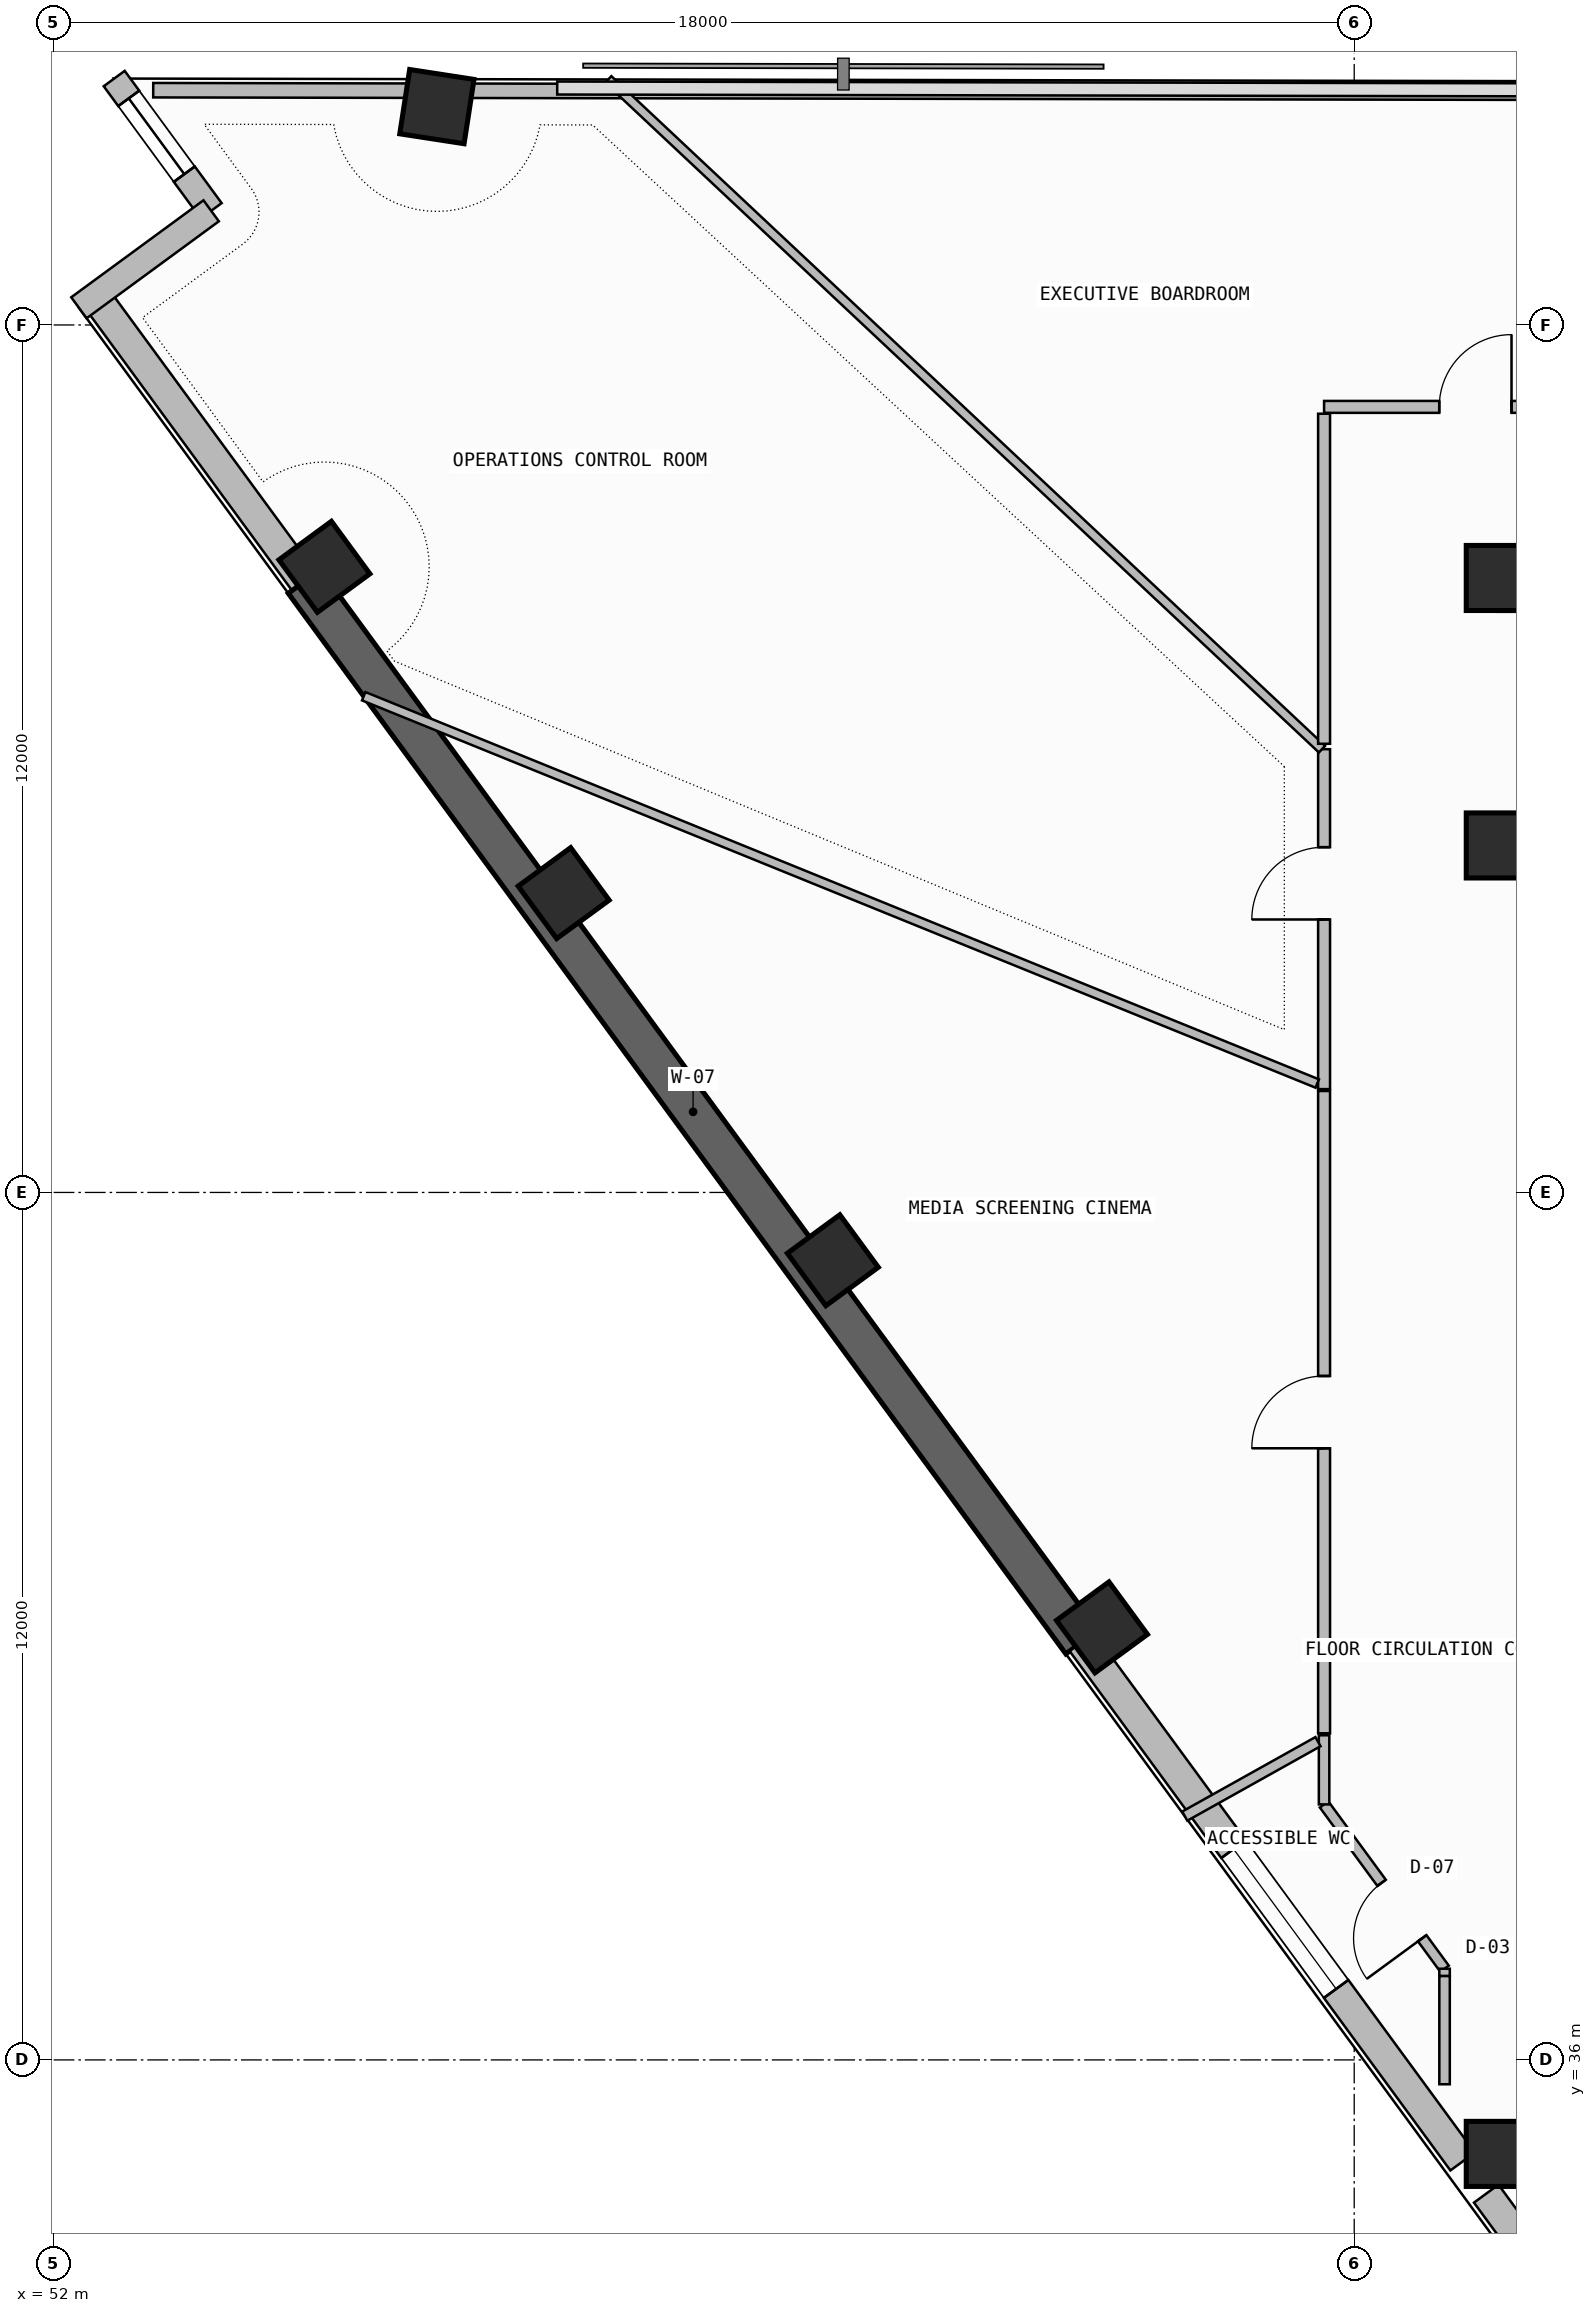
"""IFC4 building model, lengths in metres.
Left out: names, types, materials, properties, quantities, classifications, styles, units other than length and angle.
Written with IfcOpenShell. Run it as: python <this file> out.ifc"""

import sys

from ifc_helpers import new_model, si_unit, direction, frame, frame_2d, origin, origin_2d, place, context, subcontext, project, spatial, rectangle, extrude, element, fill, save


model = new_model("IFC4")
c1 = context("Model", 3, precision=1e-05, world=origin(), true_north=direction((0.0, 1.0)))
c2 = subcontext(c1, "Body", "Model", "MODEL_VIEW")
j1 = project(units=[si_unit("LENGTHUNIT", "METRE"), si_unit("PLANEANGLEUNIT", "RADIAN")], contexts=[c1])
p1 = place(None, origin())
s1 = spatial("IfcSite", under=j1, at=p1, CompositionType="ELEMENT")
p2 = place(p1, origin())
s2 = spatial("IfcBuilding", under=s1, at=p2, CompositionType="ELEMENT")
p3 = place(p2, frame((0.0, 0.0, 246.66)))
s3 = spatial("IfcBuildingStorey", under=s2, at=p3, CompositionType="ELEMENT", Elevation=246.66)
p4 = place(p3, frame((72.0, 56.35, -0.26), z_axis=(0.0, 0.0, 1.0), x_axis=(1.0, 0.0, 0.0)))
e1 = element("IfcWall", 1, at=p4, inside=s3, PredefinedType="SHEAR", context=c2, shape_type="SweptSolid", body=[
    extrude(rectangle(XDim=13.6, YDim=0.6, at=frame_2d((6.8, 0.0))), origin(), (0.0, 0.0, 1.0), 3.52),
])
for number, where, z_axis, x_axis in (
    (2, (72.0, 34.7, 0.0), (0.0, 0.0, 1.0), (1.0, 0.0, 0.0)),
    (3, (72.0, 52.8, 0.0), (0.0, 0.0, 1.0), (1.0, 0.0, 0.0)),
    (4, (72.0, 56.5, 0.0), (0.0, 0.0, 1.0), (1.0, 0.0, 0.0)),
    (5, (57.309, 63.021, 0.0), (0.0, 0.0, 1.0), (0.152, 0.988, 0.0)),
    (6, (55.753, 56.654, 0.0), (0.0, 0.0, 1.0), (-0.591, 0.806, 0.0)),
    (7, (59.063, 52.14, 0.0), (0.0, 0.0, 1.0), (-0.591, 0.806, 0.0)),
    (8, (62.787, 47.062, 0.0), (0.0, 0.0, 1.0), (-0.591, 0.806, 0.0)),
    (9, (66.51, 41.983, 0.0), (0.0, 0.0, 1.0), (-0.591, 0.806, 0.0)),
):
    element("IfcColumn", number, at=place(p3, frame(where, z_axis=z_axis, x_axis=x_axis)), inside=s3, PredefinedType="COLUMN", context=c2, shape_type="SweptSolid", body=[
        extrude(rectangle(XDim=0.9, YDim=0.9, at=origin_2d()), origin(), (0.0, 0.0, 1.0), 3.52),
    ])
p5 = place(p3, frame((52.579, 60.4, 0.0), z_axis=(0.0, 0.0, 1.0), x_axis=(0.591311800505, -0.806443026248, 0.0)))
e10 = element("IfcWall", 10, at=p5, inside=s3, PredefinedType="SOLIDWALL", context=c2, shape_type="SweptSolid", body=[
    extrude(rectangle(XDim=4.898, YDim=0.42, at=frame_2d((2.449, 0.0))), origin(), (0.0, 0.0, 1.0), 2.645),
])
p6 = place(p3, frame((55.475, 56.45, -0.26), z_axis=(0.0, 0.0, 1.0), x_axis=(0.591309555876, -0.806444672082, 0.0)))
e11 = element("IfcWall", 11, at=p6, inside=s3, PredefinedType="SHEAR", context=c2, shape_type="SweptSolid", body=[
    extrude(rectangle(XDim=18.192, YDim=0.55, at=frame_2d((9.096, 0.0))), origin(), (0.0, 0.0, 1.0), 3.52),
])
p7 = place(p3, frame((66.232, 41.779, 0.0), z_axis=(0.0, 0.0, 1.0), x_axis=(0.591309008949, -0.806445073105, 0.0)))
e12 = element("IfcWall", 12, at=p7, inside=s3, PredefinedType="SOLIDWALL", context=c2, shape_type="SweptSolid", body=[
    extrude(rectangle(XDim=8.908, YDim=0.42, at=frame_2d((4.454, 0.0))), origin(), (0.0, 0.0, 1.0), 2.645),
])
p8 = place(p7, frame((3.549, 0.0, 1.1)))
e13 = element("IfcOpeningElement", 13, at=p8, cuts=e12, PredefinedType="OPENING", context=c2, shape_type="SweptSolid", body=[
    extrude(rectangle(XDim=2.4, YDim=1.2, at=frame_2d((1.2, 0.6))), frame((0.0, 0.22, 0.0), z_axis=(0.0, -1.0, 0.0), x_axis=(1.0, 0.0, 0.0)), (0.0, 0.0, 1.0), 0.44),
])
p9 = place(p3, frame((71.826, 34.15, 0.0), z_axis=(0.0, 0.0, 1.0), x_axis=(0.591315835946, -0.806440067308, 0.0)))
e14 = element("IfcWall", 14, at=p9, inside=s3, PredefinedType="SOLIDWALL", context=c2, shape_type="SweptSolid", body=[
    extrude(rectangle(XDim=2.434, YDim=0.42, at=frame_2d((1.217, 0.0))), origin(), (0.0, 0.0, 1.0), 3.26),
])
p10 = place(p3, frame((52.845, 63.409, 0.0), z_axis=(0.0, 0.0, 1.0), x_axis=(0.591251685745, -0.806487101015, 0.0)))
e15 = element("IfcWall", 15, at=p10, inside=s3, PredefinedType="SOLIDWALL", context=c2, shape_type="SweptSolid", body=[
    extrude(rectangle(XDim=2.269, YDim=0.36, at=frame_2d((1.134, 0.0))), origin(), (0.0, 0.0, 1.0), 3.26),
])
p11 = place(p10, frame((0.34, 0.0, 0.45)))
e16 = element("IfcOpeningElement", 16, at=p11, cuts=e15, PredefinedType="OPENING", context=c2, shape_type="SweptSolid", body=[
    extrude(rectangle(XDim=1.3, YDim=2.4, at=frame_2d((0.65, 1.2))), frame((0.0, 0.19, 0.0), z_axis=(0.0, -1.0, 0.0), x_axis=(1.0, 0.0, 0.0)), (0.0, 0.0, 1.0), 0.38),
])
p12 = place(p3, frame((54.187, 61.579, 0.0), z_axis=(0.0, 0.0, 1.0), x_axis=(-0.806449475274, -0.591303005092, 0.0)))
e17 = element("IfcWall", 17, at=p12, inside=s3, PredefinedType="SOLIDWALL", context=c2, shape_type="SweptSolid", body=[
    extrude(rectangle(XDim=2.268, YDim=0.36, at=frame_2d((1.134, 0.0))), origin(), (0.0, 0.0, 1.0), 3.26),
])
p13 = place(p3, frame((83.332, 63.193, 0.0), z_axis=(0.0, 0.0, 1.0), x_axis=(-0.999998363757, 0.001809000383, 0.0)))
e18 = element("IfcWall", 18, at=p13, inside=s3, PredefinedType="PARAPET", context=c2, shape_type="SweptSolid", body=[
    extrude(rectangle(XDim=25.777, YDim=0.2, at=frame_2d((12.889, 0.0))), origin(), (0.0, 0.0, 1.0), 1.15),
])
p14 = place(p3, frame((57.064, 63.241, 0.0), z_axis=(0.0, 0.0, 1.0), x_axis=(-0.999998274159, 0.001857869529, 0.0)))
e19 = element("IfcWall", 19, at=p14, inside=s3, PredefinedType="PARAPET", context=c2, shape_type="SweptSolid", body=[
    extrude(rectangle(XDim=3.679, YDim=0.2, at=frame_2d((1.84, 0.0))), origin(), (0.0, 0.0, 1.0), 1.15),
])
p15 = place(p3, frame((69.583, 39.535, 0.0), z_axis=(0.0, 0.0, 1.0), x_axis=(0.591303583947, -0.806449050847, 0.0)))
e20 = element("IfcWall", 20, at=p15, inside=s3, PredefinedType="PARTITIONING", context=c2, shape_type="SweptSolid", body=[
    extrude(rectangle(XDim=2.819, YDim=0.145, at=frame_2d((1.409, 0.0))), origin(), (0.0, 0.0, 1.0), 3.26),
])
p16 = place(p15, frame((1.346, 0.0, 0.0)))
e21 = element("IfcOpeningElement", 21, at=p16, cuts=e20, PredefinedType="OPENING", context=c2, shape_type="SweptSolid", body=[
    extrude(rectangle(XDim=0.95, YDim=2.15, at=frame_2d((0.475, 1.075))), frame((0.0, 0.083, 0.0), z_axis=(0.0, -1.0, 0.0), x_axis=(1.0, 0.0, 0.0)), (0.0, 0.0, 1.0), 0.165),
])
p17 = place(p3, frame((69.583, 40.491, 0.0), z_axis=(0.0, 0.0, 1.0), x_axis=(0.0, -1.0, 0.0)))
e22 = element("IfcWall", 22, at=p17, inside=s3, PredefinedType="PARTITIONING", context=c2, shape_type="SweptSolid", body=[
    extrude(rectangle(XDim=0.956, YDim=0.145, at=frame_2d((0.478, 0.0))), origin(), (0.0, 0.0, 1.0), 3.26),
])
p18 = place(p3, frame((71.25, 37.261, 0.0), z_axis=(0.0, 0.0, 1.0), x_axis=(0.0, -1.0, 0.0)))
e23 = element("IfcWall", 23, at=p18, inside=s3, PredefinedType="PARTITIONING", context=c2, shape_type="SweptSolid", body=[
    extrude(rectangle(XDim=0.102, YDim=0.145, at=frame_2d((0.051, 0.0))), origin(), (0.0, 0.0, 1.0), 3.26),
])
p19 = place(p3, frame((67.656, 39.373, 0.0), z_axis=(0.0, 0.0, 1.0), x_axis=(0.872894231042, 0.487909480758, 0.0)))
e24 = element("IfcWall", 24, at=p19, inside=s3, PredefinedType="PARTITIONING", context=c2, shape_type="SweptSolid", body=[
    extrude(rectangle(XDim=2.111, YDim=0.145, at=frame_2d((1.056, 0.0))), origin(), (0.0, 0.0, 1.0), 3.26),
])
p20 = place(p3, frame((69.583, 54.132, 0.0), z_axis=(0.0, 0.0, 1.0), x_axis=(0.0, -1.0, 0.0)))
e25 = element("IfcWall", 25, at=p20, inside=s3, PredefinedType="PARTITIONING", context=c2, shape_type="SweptSolid", body=[
    extrude(rectangle(XDim=4.702, YDim=0.165, at=frame_2d((2.351, 0.0))), origin(), (0.0, 0.0, 1.0), 2.745),
])
p21 = place(p20, frame((1.356, 0.0, 0.0)))
e26 = element("IfcOpeningElement", 26, at=p21, cuts=e25, PredefinedType="OPENING", context=c2, shape_type="SweptSolid", body=[
    extrude(rectangle(XDim=1.0, YDim=2.2, at=frame_2d((0.5, 1.1))), frame((0.0, 0.093, 0.0), z_axis=(0.0, -1.0, 0.0), x_axis=(1.0, 0.0, 0.0)), (0.0, 0.0, 1.0), 0.185),
])
p22 = place(p3, frame((59.68, 63.396, 0.0), z_axis=(0.0, 0.0, 1.0), x_axis=(0.729243049034, -0.684254759161, 0.0)))
e27 = element("IfcWall", 27, at=p22, inside=s3, PredefinedType="PARTITIONING", context=c2, shape_type="SweptSolid", body=[
    extrude(rectangle(XDim=13.54, YDim=0.125, at=frame_2d((6.77, 0.0))), origin(), (0.0, 0.0, 1.0), 2.745),
])
p23 = place(p3, frame((69.489, 49.507, 0.0), z_axis=(0.0, 0.0, 1.0), x_axis=(-0.926495909369, 0.376304836433, 0.0)))
e28 = element("IfcWall", 28, at=p23, inside=s3, PredefinedType="PARTITIONING", context=c2, shape_type="SweptSolid", body=[
    extrude(rectangle(XDim=14.238, YDim=0.125, at=frame_2d((7.119, 0.0))), origin(), (0.0, 0.0, 1.0), 2.645),
])
p24 = place(p3, frame((74.964, 58.867, 0.0), z_axis=(0.0, 0.0, 1.0), x_axis=(-1.0, 0.0, 0.0)))
e29 = element("IfcWall", 29, at=p24, inside=s3, PredefinedType="PARTITIONING", context=c2, shape_type="SweptSolid", body=[
    extrude(rectangle(XDim=5.38, YDim=0.165, at=frame_2d((2.69, 0.0))), origin(), (0.0, 0.0, 1.0), 3.26),
])
p25 = place(p24, frame((2.787, 0.0, 0.0)))
e30 = element("IfcOpeningElement", 30, at=p25, cuts=e29, PredefinedType="OPENING", context=c2, shape_type="SweptSolid", body=[
    extrude(rectangle(XDim=1.0, YDim=2.2, at=frame_2d((0.5, 1.1))), frame((0.0, 0.093, 0.0), z_axis=(0.0, -1.0, 0.0), x_axis=(1.0, 0.0, 0.0)), (0.0, 0.0, 1.0), 0.185),
])
p26 = place(p3, frame((69.583, 58.772, 0.0), z_axis=(0.0, 0.0, 1.0), x_axis=(0.0, -1.0, 0.0)))
e31 = element("IfcWall", 31, at=p26, inside=s3, PredefinedType="PARTITIONING", context=c2, shape_type="SweptSolid", body=[
    extrude(rectangle(XDim=4.566, YDim=0.165, at=frame_2d((2.283, 0.0))), origin(), (0.0, 0.0, 1.0), 2.745),
])
p27 = place(p3, frame((69.583, 49.403, 0.0), z_axis=(0.0, 0.0, 1.0), x_axis=(0.0, -1.0, 0.0)))
e32 = element("IfcWall", 32, at=p27, inside=s3, PredefinedType="PARTITIONING", context=c2, shape_type="SweptSolid", body=[
    extrude(rectangle(XDim=8.885, YDim=0.165, at=frame_2d((4.442, 0.0))), origin(), (0.0, 0.0, 1.0), 3.26),
])
p28 = place(p27, frame((3.942, 0.0, 0.0)))
e33 = element("IfcOpeningElement", 33, at=p28, cuts=e32, PredefinedType="OPENING", context=c2, shape_type="SweptSolid", body=[
    extrude(rectangle(XDim=1.0, YDim=2.2, at=frame_2d((0.5, 1.1))), frame((0.0, 0.093, 0.0), z_axis=(0.0, -1.0, 0.0), x_axis=(1.0, 0.0, 0.0)), (0.0, 0.0, 1.0), 0.185),
])
p29 = place(p3, frame((71.25, 37.16, 0.0), z_axis=(0.0, 0.0, 1.0), x_axis=(0.0, -1.0, 0.0)))
e34 = element("IfcWall", 34, at=p29, inside=s3, PredefinedType="PARTITIONING", context=c2, shape_type="SweptSolid", body=[
    extrude(rectangle(XDim=1.497, YDim=0.145, at=frame_2d((0.748, 0.0))), origin(), (0.0, 0.0, 1.0), 3.26),
])
p30 = place(p8, origin())
e35 = element("IfcWindow", 35, at=p30, inside=s3, PartitioningType="SINGLE_PANEL", PredefinedType="WINDOW", context=c2, shape_type="SweptSolid", body=[
    extrude(rectangle(XDim=2.4, YDim=1.2, at=frame_2d((1.2, 0.6))), frame((0.0, 0.03, 0.0), z_axis=(0.0, -1.0, 0.0), x_axis=(1.0, 0.0, 0.0)), (0.0, 0.0, 1.0), 0.06),
])
fill(e13, e35)
p31 = place(p11, origin())
e36 = element("IfcWindow", 36, at=p31, inside=s3, PartitioningType="SINGLE_PANEL", PredefinedType="WINDOW", context=c2, shape_type="SweptSolid", body=[
    extrude(rectangle(XDim=1.3, YDim=2.4, at=frame_2d((0.65, 1.2))), frame((0.0, 0.03, 0.0), z_axis=(0.0, -1.0, 0.0), x_axis=(1.0, 0.0, 0.0)), (0.0, 0.0, 1.0), 0.06),
])
fill(e16, e36)
p32 = place(p16, frame((0.95, 0.0, 0.0), z_axis=(0.0, 0.0, 1.0), x_axis=(-1.0, 0.0, 0.0)))
e37 = element("IfcDoor", 37, at=p32, inside=s3, OperationType="SINGLE_SWING_LEFT", PredefinedType="DOOR", context=c2, shape_type="SweptSolid", body=[
    extrude(rectangle(XDim=0.95, YDim=2.15, at=frame_2d((0.475, 1.075))), frame((0.0, 0.025, 0.0), z_axis=(0.0, -1.0, 0.0), x_axis=(1.0, 0.0, 0.0)), (0.0, 0.0, 1.0), 0.05),
])
fill(e21, e37)
p33 = place(p21, frame((1.0, 0.0, 0.0), z_axis=(0.0, 0.0, 1.0), x_axis=(-1.0, 0.0, 0.0)))
e38 = element("IfcDoor", 38, at=p33, inside=s3, OperationType="SINGLE_SWING_LEFT", PredefinedType="DOOR", context=c2, shape_type="SweptSolid", body=[
    extrude(rectangle(XDim=1.0, YDim=2.2, at=frame_2d((0.5, 1.1))), frame((0.0, 0.025, 0.0), z_axis=(0.0, -1.0, 0.0), x_axis=(1.0, 0.0, 0.0)), (0.0, 0.0, 1.0), 0.05),
])
fill(e26, e38)
p34 = place(p25, frame((1.0, 0.0, 0.0), z_axis=(0.0, 0.0, 1.0), x_axis=(-1.0, 0.0, 0.0)))
e39 = element("IfcDoor", 39, at=p34, inside=s3, OperationType="SINGLE_SWING_RIGHT", PredefinedType="DOOR", context=c2, shape_type="SweptSolid", body=[
    extrude(rectangle(XDim=1.0, YDim=2.2, at=frame_2d((0.5, 1.1))), frame((0.0, 0.025, 0.0), z_axis=(0.0, -1.0, 0.0), x_axis=(1.0, 0.0, 0.0)), (0.0, 0.0, 1.0), 0.05),
])
fill(e30, e39)
p35 = place(p28, frame((1.0, 0.0, 0.0), z_axis=(0.0, 0.0, 1.0), x_axis=(-1.0, 0.0, 0.0)))
e40 = element("IfcDoor", 40, at=p35, inside=s3, OperationType="SINGLE_SWING_LEFT", PredefinedType="DOOR", context=c2, shape_type="SweptSolid", body=[
    extrude(rectangle(XDim=1.0, YDim=2.2, at=frame_2d((0.5, 1.1))), frame((0.0, 0.025, 0.0), z_axis=(0.0, -1.0, 0.0), x_axis=(1.0, 0.0, 0.0)), (0.0, 0.0, 1.0), 0.05),
])
fill(e33, e40)
save(model, sys.argv[1])
